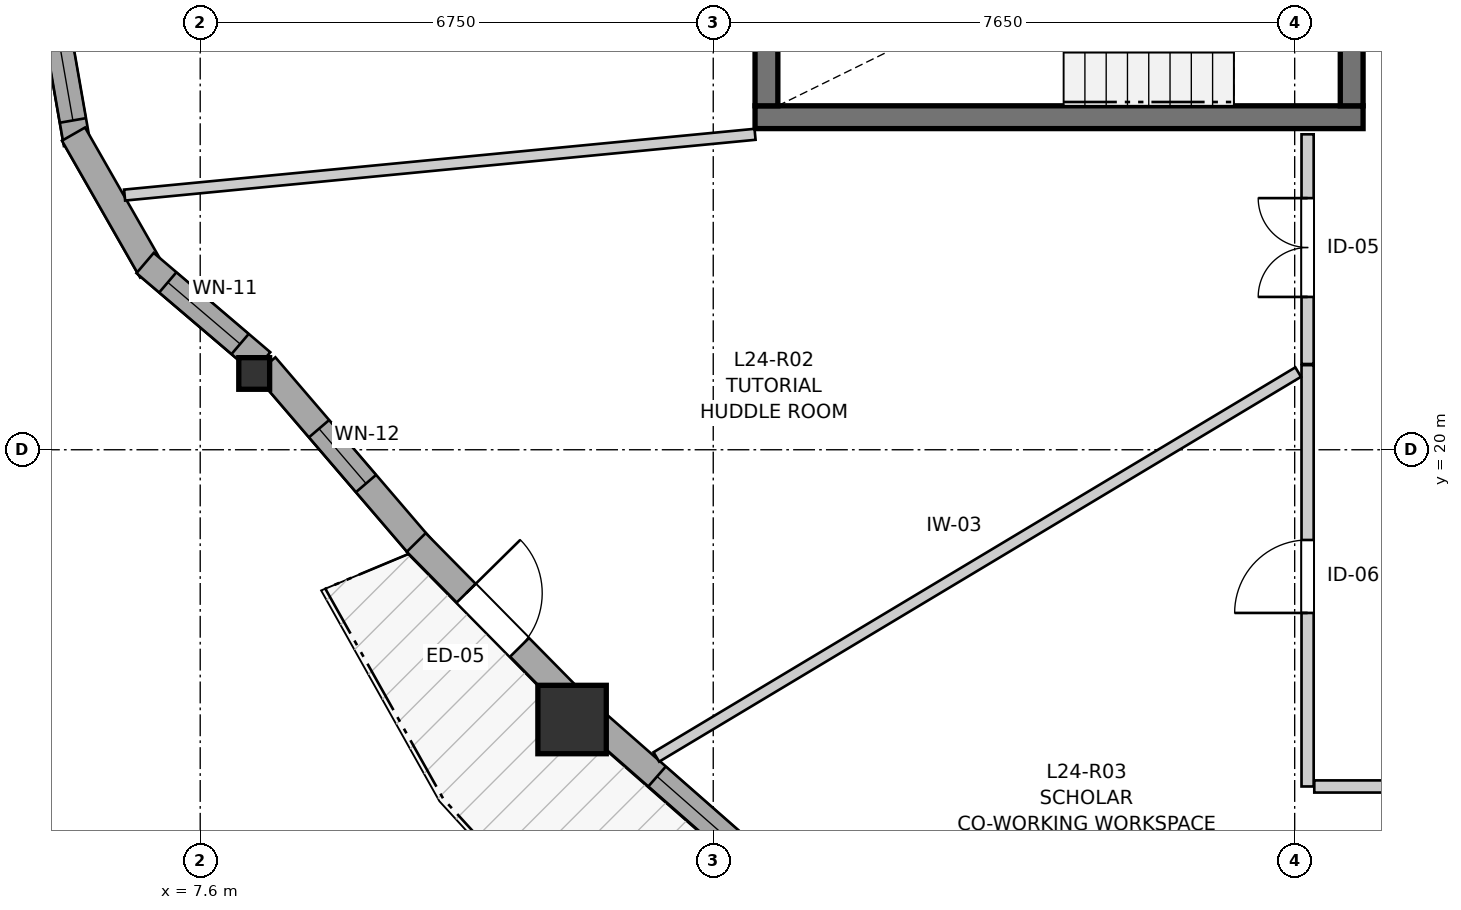
"""IFC4 building model, lengths in metres.
Left out: names, types, materials, properties, quantities, classifications, styles, units other than length and angle.
Written with IfcOpenShell. Run it as: python <this file> out.ifc"""

import sys

from ifc_helpers import new_model, si_unit, direction, frame, frame_2d, origin, origin_2d, place, context, subcontext, project, spatial, rectangle, i_section, extrude, source, transform, mapped, element, fill, save


model = new_model("IFC4")
c1 = context("Model", 3, precision=1e-05, world=origin(), true_north=direction((0.0, 1.0)))
c2 = subcontext(c1, "Body", "Model", "MODEL_VIEW")
j1 = project(units=[si_unit("LENGTHUNIT", "METRE"), si_unit("PLANEANGLEUNIT", "RADIAN")], contexts=[c1])
p1 = place(None, origin())
s1 = spatial("IfcSite", under=j1, at=p1, CompositionType="ELEMENT")
p2 = place(p1, origin())
s2 = spatial("IfcBuilding", under=s1, at=p2, CompositionType="ELEMENT")
p3 = place(p2, frame((0.0, 0.0, 83.2)))
s3 = spatial("IfcBuildingStorey", under=s2, at=p3, CompositionType="ELEMENT", Elevation=83.2)
p4 = place(p3, frame((14.9, 24.375, 0.0), z_axis=(0.0, 0.0, 1.0), x_axis=(1.0, 0.0, 0.0)))
e1 = element("IfcWall", 1, at=p4, inside=s3, PredefinedType="SHEAR", context=c2, shape_type="SweptSolid", body=[
    extrude(rectangle(XDim=8.0, YDim=0.3, at=frame_2d((4.0, 0.0))), origin(), (0.0, 0.0, 1.0), 2.935),
])
p5 = place(p3, frame((15.05, 27.475, 0.0), z_axis=(0.0, 0.0, 1.0), x_axis=(0.0, -1.0, 0.0)))
e2 = element("IfcWall", 2, at=p5, inside=s3, PredefinedType="SHEAR", context=c2, shape_type="SweptSolid", body=[
    extrude(rectangle(XDim=2.95, YDim=0.3, at=frame_2d((1.475, 0.0))), origin(), (0.0, 0.0, 1.0), 2.935),
])
p6 = place(p3, frame((22.75, 24.525, 0.0), z_axis=(0.0, 0.0, 1.0), x_axis=(0.0, 1.0, 0.0)))
e3 = element("IfcWall", 3, at=p6, inside=s3, PredefinedType="SHEAR", context=c2, shape_type="SweptSolid", body=[
    extrude(rectangle(XDim=2.95, YDim=0.3, at=frame_2d((1.475, 0.0))), origin(), (0.0, 0.0, 1.0), 2.935),
])
p7 = place(p6, frame((0.985, 0.0, 0.0)))
e4 = element("IfcOpeningElement", 4, at=p7, cuts=e3, PredefinedType="OPENING", context=c2, shape_type="SweptSolid", body=[
    extrude(rectangle(XDim=0.98, YDim=2.15, at=frame_2d((0.49, 1.075))), frame((0.0, 0.16, 0.0), z_axis=(0.0, -1.0, 0.0), x_axis=(1.0, 0.0, 0.0)), (0.0, 0.0, 1.0), 0.32),
])
m1 = source(origin(), c2, "Body", "SweptSolid", [
    extrude(i_section(OverallWidth=0.406, OverallDepth=0.416, WebThickness=0.027, FlangeThickness=0.044, FilletRadius=0.015, at=origin_2d()), origin(), (0.0, 0.0, 1.0), 2.935),
])
p8 = place(p3, frame((8.31, 21.004, 0.0), z_axis=(0.0, 0.0, 1.0), x_axis=(1.0, 0.0, 0.0)))
e5 = element("IfcColumn", 5, at=p8, inside=s3, PredefinedType="PILASTER", context=c2, shape_type="MappedRepresentation", body=[
    mapped(m1, transform((0.0, 0.0, 0.0), x_axis=(1.0, 0.0, 0.0), y_axis=(0.0, 1.0, 0.0), z_axis=(0.0, 0.0, 1.0), scale=1.0)),
])
m2 = source(origin(), c2, "Body", "SweptSolid", [
    extrude(rectangle(XDim=0.9, YDim=0.9, at=origin_2d()), origin(), (0.0, 0.0, 1.0), 2.935),
])
p9 = place(p3, frame((12.493, 16.451, 0.0), z_axis=(0.0, 0.0, 1.0), x_axis=(1.0, 0.0, 0.0)))
e6 = element("IfcColumn", 6, at=p9, inside=s3, PredefinedType="COLUMN", context=c2, shape_type="MappedRepresentation", body=[
    mapped(m2, transform((0.0, 0.0, 0.0), x_axis=(1.0, 0.0, 0.0), y_axis=(0.0, 1.0, 0.0), z_axis=(0.0, 0.0, 1.0), scale=1.0)),
])
p10 = place(p3, frame((5.622, 26.068, 0.0), z_axis=(0.0, 0.0, 1.0), x_axis=(0.172166087538, -0.985067935881, 0.0)))
e7 = element("IfcWall", 7, at=p10, inside=s3, PredefinedType="SOLIDWALL", context=c2, shape_type="SweptSolid", body=[
    extrude(rectangle(XDim=2.073, YDim=0.35, at=frame_2d((1.037, 0.0))), origin(), (0.0, 0.0, 1.0), 2.465),
])
p11 = place(p10, frame((0.312, 0.0, 0.82)))
e8 = element("IfcOpeningElement", 8, at=p11, cuts=e7, PredefinedType="OPENING", context=c2, shape_type="SweptSolid", body=[
    extrude(rectangle(XDim=1.45, YDim=1.25, at=frame_2d((0.725, 0.625))), frame((0.0, 0.185, 0.0), z_axis=(0.0, -1.0, 0.0), x_axis=(1.0, 0.0, 0.0)), (0.0, 0.0, 1.0), 0.37),
])
p12 = place(p3, frame((5.933, 24.153, 0.0), z_axis=(0.0, 0.0, 1.0), x_axis=(0.496037473582, -0.868301114132, 0.0)))
e9 = element("IfcWall", 9, at=p12, inside=s3, PredefinedType="SOLIDWALL", context=c2, shape_type="SweptSolid", body=[
    extrude(rectangle(XDim=2.073, YDim=0.35, at=frame_2d((1.037, 0.0))), origin(), (0.0, 0.0, 1.0), 2.465),
])
p13 = place(p3, frame((6.875, 22.457, 0.0), z_axis=(0.0, 0.0, 1.0), x_axis=(0.761203352049, -0.648513266502, 0.0)))
e10 = element("IfcWall", 10, at=p13, inside=s3, PredefinedType="SOLIDWALL", context=c2, shape_type="SweptSolid", body=[
    extrude(rectangle(XDim=2.015, YDim=0.35, at=frame_2d((1.007, 0.0))), origin(), (0.0, 0.0, 1.0), 2.465),
])
p14 = place(p13, frame((0.393, 0.0, 0.82)))
e11 = element("IfcOpeningElement", 11, at=p14, cuts=e10, PredefinedType="OPENING", context=c2, shape_type="SweptSolid", body=[
    extrude(rectangle(XDim=1.25, YDim=1.35, at=frame_2d((0.625, 0.675))), frame((0.0, 0.185, 0.0), z_axis=(0.0, -1.0, 0.0), x_axis=(1.0, 0.0, 0.0)), (0.0, 0.0, 1.0), 0.37),
])
p15 = place(p3, frame((8.456, 21.102, 0.0), z_axis=(0.0, 0.0, 1.0), x_axis=(0.650733809993, -0.759305938692, 0.0)))
e12 = element("IfcWall", 12, at=p15, inside=s3, PredefinedType="SOLIDWALL", context=c2, shape_type="SweptSolid", body=[
    extrude(rectangle(XDim=3.144, YDim=0.35, at=frame_2d((1.572, 0.0))), origin(), (0.0, 0.0, 1.0), 2.465),
])
p16 = place(p15, frame((1.087, 0.0, 0.82)))
e13 = element("IfcOpeningElement", 13, at=p16, cuts=e12, PredefinedType="OPENING", context=c2, shape_type="SweptSolid", body=[
    extrude(rectangle(XDim=0.95, YDim=1.35, at=frame_2d((0.475, 0.675))), frame((0.0, 0.185, 0.0), z_axis=(0.0, -1.0, 0.0), x_axis=(1.0, 0.0, 0.0)), (0.0, 0.0, 1.0), 0.37),
])
p17 = place(p3, frame((10.442, 18.78, 0.0), z_axis=(0.0, 0.0, 1.0), x_axis=(0.7019473345, -0.712228853381, 0.0)))
e14 = element("IfcWall", 14, at=p17, inside=s3, PredefinedType="SOLIDWALL", context=c2, shape_type="SweptSolid", body=[
    extrude(rectangle(XDim=2.873, YDim=0.35, at=frame_2d((1.437, 0.0))), origin(), (0.0, 0.0, 1.0), 2.465),
])
p18 = place(p17, frame((0.937, 0.0, 0.0)))
e15 = element("IfcOpeningElement", 15, at=p18, cuts=e14, PredefinedType="OPENING", context=c2, shape_type="SweptSolid", body=[
    extrude(rectangle(XDim=1.0, YDim=2.1, at=frame_2d((0.5, 1.05))), frame((0.0, 0.185, 0.0), z_axis=(0.0, -1.0, 0.0), x_axis=(1.0, 0.0, 0.0)), (0.0, 0.0, 1.0), 0.37),
])
p19 = place(p3, frame((12.777, 16.434, 0.0), z_axis=(0.0, 0.0, 1.0), x_axis=(0.751531192513, -0.659697556976, 0.0)))
e16 = element("IfcWall", 16, at=p19, inside=s3, PredefinedType="SOLIDWALL", context=c2, shape_type="SweptSolid", body=[
    extrude(rectangle(XDim=2.823, YDim=0.35, at=frame_2d((1.412, 0.0))), origin(), (0.0, 0.0, 1.0), 2.465),
])
p20 = place(p19, frame((1.11, 0.0, 0.82)))
e17 = element("IfcOpeningElement", 17, at=p20, cuts=e16, PredefinedType="OPENING", context=c2, shape_type="SweptSolid", body=[
    extrude(rectangle(XDim=1.45, YDim=1.25, at=frame_2d((0.725, 0.625))), frame((0.0, 0.185, 0.0), z_axis=(0.0, -1.0, 0.0), x_axis=(1.0, 0.0, 0.0)), (0.0, 0.0, 1.0), 0.37),
])
p21 = place(p3, frame((22.17, 15.57, 0.0), z_axis=(0.0, 0.0, 1.0), x_axis=(0.0, 1.0, 0.0)))
e18 = element("IfcWall", 18, at=p21, inside=s3, PredefinedType="PARTITIONING", context=c2, shape_type="SweptSolid", body=[
    extrude(rectangle(XDim=5.543, YDim=0.16, at=frame_2d((2.771, 0.0))), origin(), (0.0, 0.0, 1.0), 2.935),
])
p22 = place(p21, frame((2.283, 0.0, 0.0)))
e19 = element("IfcOpeningElement", 19, at=p22, cuts=e18, PredefinedType="OPENING", context=c2, shape_type="SweptSolid", body=[
    extrude(rectangle(XDim=0.96, YDim=2.1, at=frame_2d((0.48, 1.05))), frame((0.0, 0.09, 0.0), z_axis=(0.0, -1.0, 0.0), x_axis=(1.0, 0.0, 0.0)), (0.0, 0.0, 1.0), 0.18),
])
p23 = place(p3, frame((22.17, 21.128, 0.0), z_axis=(0.0, 0.0, 1.0), x_axis=(0.0, 1.0, 0.0)))
e20 = element("IfcWall", 20, at=p23, inside=s3, PredefinedType="PARTITIONING", context=c2, shape_type="SweptSolid", body=[
    extrude(rectangle(XDim=3.022, YDim=0.16, at=frame_2d((1.511, 0.0))), origin(), (0.0, 0.0, 1.0), 2.935),
])
p24 = place(p23, frame((0.883, 0.0, 0.0)))
e21 = element("IfcOpeningElement", 21, at=p24, cuts=e20, PredefinedType="OPENING", context=c2, shape_type="SweptSolid", body=[
    extrude(rectangle(XDim=1.3, YDim=2.1, at=frame_2d((0.65, 1.05))), frame((0.0, 0.09, 0.0), z_axis=(0.0, -1.0, 0.0), x_axis=(1.0, 0.0, 0.0)), (0.0, 0.0, 1.0), 0.18),
])
p25 = place(p3, frame((13.601, 15.958, 0.0), z_axis=(0.0, 0.0, 1.0), x_axis=(0.857661345212, 0.514214952066, 0.0)))
e22 = element("IfcWall", 22, at=p25, inside=s3, PredefinedType="PARTITIONING", context=c2, shape_type="SweptSolid", body=[
    extrude(rectangle(XDim=9.846, YDim=0.145, at=frame_2d((4.923, 0.0))), origin(), (0.0, 0.0, 1.0), 2.935),
])
p26 = place(p3, frame((6.605, 23.351, 0.0), z_axis=(0.0, 0.0, 1.0), x_axis=(0.995388985265, 0.09592063393, 0.0)))
e23 = element("IfcWall", 23, at=p26, inside=s3, PredefinedType="PARTITIONING", context=c2, shape_type="SweptSolid", body=[
    extrude(rectangle(XDim=8.333, YDim=0.145, at=frame_2d((4.167, 0.0))), origin(), (0.0, 0.0, 1.0), 2.935),
])
p27 = place(p3, frame((23.186, 9.634, 0.0), z_axis=(0.0, 0.0, 1.0), x_axis=(0.400994208685, 0.916080588486, 0.0)))
e24 = element("IfcWall", 24, at=p27, inside=s3, PredefinedType="PARTITIONING", context=c2, shape_type="SweptSolid", body=[
    extrude(rectangle(XDim=6.353, YDim=0.145, at=frame_2d((3.177, 0.0))), origin(), (0.0, 0.0, 1.0), 2.935),
])
p28 = place(p3, frame((22.258, 15.57, 0.0), z_axis=(0.0, 0.0, 1.0), x_axis=(1.0, 0.0, 0.0)))
e25 = element("IfcWall", 25, at=p28, inside=s3, PredefinedType="PARTITIONING", context=c2, shape_type="SweptSolid", body=[
    extrude(rectangle(XDim=3.373, YDim=0.16, at=frame_2d((1.687, 0.0))), origin(), (0.0, 0.0, 1.0), 2.935),
])
m3 = source(origin(), c2, "Body", "SweptSolid", [
    extrude(rectangle(XDim=1.45, YDim=1.25, at=frame_2d((0.725, 0.625))), frame((0.0, 0.03, 0.0), z_axis=(0.0, -1.0, 0.0), x_axis=(1.0, 0.0, 0.0)), (0.0, 0.0, 1.0), 0.06),
])
p29 = place(p11, origin())
e26 = element("IfcWindow", 26, at=p29, inside=s3, PartitioningType="SINGLE_PANEL", PredefinedType="WINDOW", context=c2, shape_type="MappedRepresentation", body=[
    mapped(m3, transform((0.0, 0.0, 0.0), x_axis=(1.0, 0.0, 0.0), y_axis=(0.0, 1.0, 0.0), z_axis=(0.0, 0.0, 1.0), scale=1.0)),
])
fill(e8, e26)
m4 = source(origin(), c2, "Body", "SweptSolid", [
    extrude(rectangle(XDim=1.25, YDim=1.35, at=frame_2d((0.625, 0.675))), frame((0.0, 0.03, 0.0), z_axis=(0.0, -1.0, 0.0), x_axis=(1.0, 0.0, 0.0)), (0.0, 0.0, 1.0), 0.06),
])
p30 = place(p14, origin())
e27 = element("IfcWindow", 27, at=p30, inside=s3, PartitioningType="SINGLE_PANEL", PredefinedType="WINDOW", context=c2, shape_type="MappedRepresentation", body=[
    mapped(m4, transform((0.0, 0.0, 0.0), x_axis=(1.0, 0.0, 0.0), y_axis=(0.0, 1.0, 0.0), z_axis=(0.0, 0.0, 1.0), scale=1.0)),
])
fill(e11, e27)
m5 = source(origin(), c2, "Body", "SweptSolid", [
    extrude(rectangle(XDim=0.95, YDim=1.35, at=frame_2d((0.475, 0.675))), frame((0.0, 0.03, 0.0), z_axis=(0.0, -1.0, 0.0), x_axis=(1.0, 0.0, 0.0)), (0.0, 0.0, 1.0), 0.06),
])
p31 = place(p16, origin())
e28 = element("IfcWindow", 28, at=p31, inside=s3, PartitioningType="SINGLE_PANEL", PredefinedType="WINDOW", context=c2, shape_type="MappedRepresentation", body=[
    mapped(m5, transform((0.0, 0.0, 0.0), x_axis=(1.0, 0.0, 0.0), y_axis=(0.0, 1.0, 0.0), z_axis=(0.0, 0.0, 1.0), scale=1.0)),
])
fill(e13, e28)
p32 = place(p20, origin())
e29 = element("IfcWindow", 29, at=p32, inside=s3, PartitioningType="SINGLE_PANEL", PredefinedType="WINDOW", context=c2, shape_type="MappedRepresentation", body=[
    mapped(m3, transform((0.0, 0.0, 0.0), x_axis=(1.0, 0.0, 0.0), y_axis=(0.0, 1.0, 0.0), z_axis=(0.0, 0.0, 1.0), scale=1.0)),
])
fill(e17, e29)
m6 = source(origin(), c2, "Body", "SweptSolid", [
    extrude(rectangle(XDim=1.0, YDim=2.1, at=frame_2d((0.5, 1.05))), frame((0.0, 0.025, 0.0), z_axis=(0.0, -1.0, 0.0), x_axis=(1.0, 0.0, 0.0)), (0.0, 0.0, 1.0), 0.05),
])
p33 = place(p18, origin())
e30 = element("IfcDoor", 30, at=p33, inside=s3, OperationType="SINGLE_SWING_LEFT", PredefinedType="DOOR", context=c2, shape_type="MappedRepresentation", body=[
    mapped(m6, transform((0.0, 0.0, 0.0), x_axis=(1.0, 0.0, 0.0), y_axis=(0.0, 1.0, 0.0), z_axis=(0.0, 0.0, 1.0), scale=1.0)),
])
fill(e15, e30)
m7 = source(origin(), c2, "Body", "SweptSolid", [
    extrude(rectangle(XDim=0.96, YDim=2.1, at=frame_2d((0.48, 1.05))), frame((0.0, 0.025, 0.0), z_axis=(0.0, -1.0, 0.0), x_axis=(1.0, 0.0, 0.0)), (0.0, 0.0, 1.0), 0.05),
])
p34 = place(p22, origin())
e31 = element("IfcDoor", 31, at=p34, inside=s3, OperationType="SINGLE_SWING_LEFT", PredefinedType="DOOR", context=c2, shape_type="MappedRepresentation", body=[
    mapped(m7, transform((0.0, 0.0, 0.0), x_axis=(1.0, 0.0, 0.0), y_axis=(0.0, 1.0, 0.0), z_axis=(0.0, 0.0, 1.0), scale=1.0)),
])
fill(e19, e31)
m8 = source(origin(), c2, "Body", "SweptSolid", [
    extrude(rectangle(XDim=1.3, YDim=2.1, at=frame_2d((0.65, 1.05))), frame((0.0, 0.025, 0.0), z_axis=(0.0, -1.0, 0.0), x_axis=(1.0, 0.0, 0.0)), (0.0, 0.0, 1.0), 0.05),
])
p35 = place(p24, origin())
e32 = element("IfcDoor", 32, at=p35, inside=s3, OperationType="DOUBLE_DOOR_SINGLE_SWING", PredefinedType="DOOR", context=c2, shape_type="MappedRepresentation", body=[
    mapped(m8, transform((0.0, 0.0, 0.0), x_axis=(1.0, 0.0, 0.0), y_axis=(0.0, 1.0, 0.0), z_axis=(0.0, 0.0, 1.0), scale=1.0)),
])
fill(e21, e32)
save(model, sys.argv[1])
